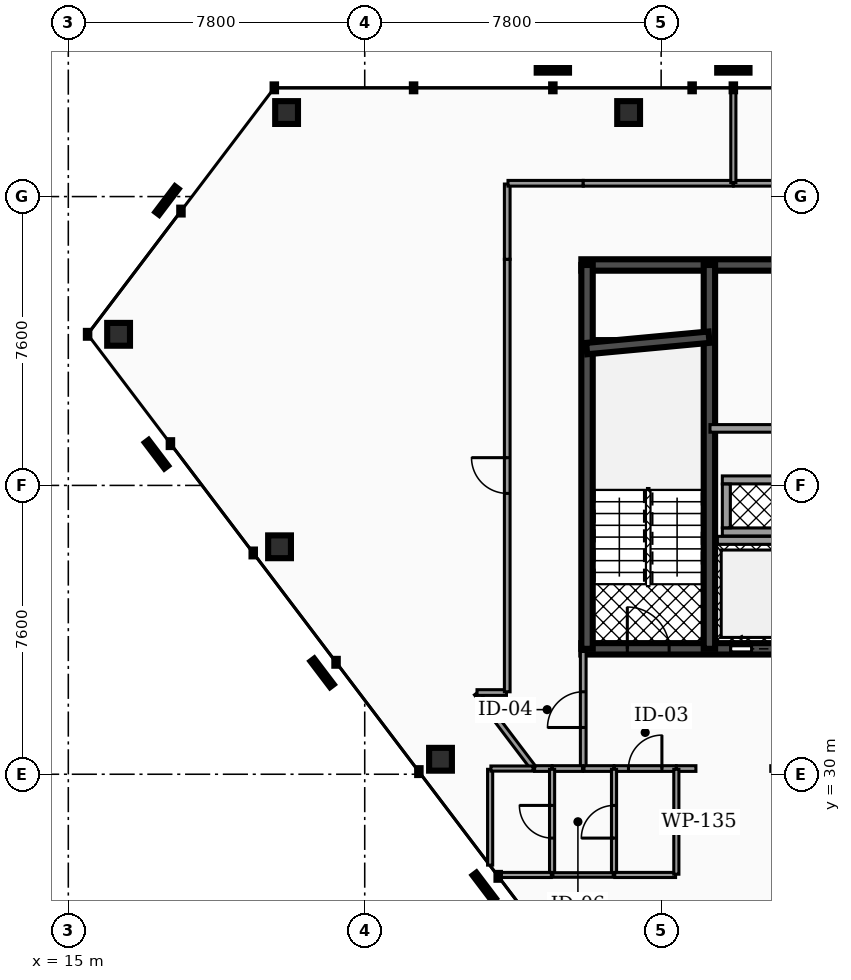
"""IFC4 building model, lengths in metres.
Left out: names, types, materials, properties, quantities, classifications, styles, units other than length and angle.
Written with IfcOpenShell. Run it as: python <this file> out.ifc"""

import sys

from ifc_helpers import new_model, si_unit, direction, frame, frame_2d, origin, origin_2d, place, context, subcontext, project, spatial, rectangle, hollow_rectangle, extrude, element, fill, save


model = new_model("IFC4")
c1 = context("Model", 3, precision=1e-05, world=origin(), true_north=direction((0.0, 1.0)))
c2 = subcontext(c1, "Body", "Model", "MODEL_VIEW")
j1 = project(units=[si_unit("LENGTHUNIT", "METRE"), si_unit("PLANEANGLEUNIT", "RADIAN")], contexts=[c1])
p1 = place(None, origin())
s1 = spatial("IfcSite", under=j1, at=p1, CompositionType="ELEMENT")
p2 = place(p1, origin())
s2 = spatial("IfcBuilding", under=s1, at=p2, CompositionType="ELEMENT")
p3 = place(p2, frame((0.0, 0.0, 246.16)))
s3 = spatial("IfcBuildingStorey", under=s2, at=p3, CompositionType="ELEMENT", Elevation=246.16)
p4 = place(p3, frame((28.5, 43.4, 0.0), z_axis=(0.0, 0.0, 1.0), x_axis=(1.0, 0.0, 0.0)))
e1 = element("IfcWall", 1, at=p4, inside=s3, PredefinedType="SHEAR", context=c2, shape_type="SweptSolid", body=[
    extrude(rectangle(XDim=19.86, YDim=0.3, at=frame_2d((9.93, 0.0))), origin(), (0.0, 0.0, 1.0), 3.18),
])
p5 = place(p3, frame((28.5, 33.3, 0.0), z_axis=(0.0, 0.0, 1.0), x_axis=(1.0, 0.0, 0.0)))
e2 = element("IfcWall", 2, at=p5, inside=s3, PredefinedType="SHEAR", context=c2, shape_type="SweptSolid", body=[
    extrude(rectangle(XDim=19.86, YDim=0.3, at=frame_2d((9.93, 0.0))), origin(), (0.0, 0.0, 1.0), 3.18),
])
p6 = place(p5, frame((3.93, 0.0, 0.0)))
e3 = element("IfcOpeningElement", 3, at=p6, cuts=e2, PredefinedType="OPENING", context=c2, shape_type="SweptSolid", body=[
    extrude(rectangle(XDim=1.1, YDim=2.15, at=frame_2d((0.55, 1.075))), frame((0.0, 0.16, 0.0), z_axis=(0.0, -1.0, 0.0), x_axis=(1.0, 0.0, 0.0)), (0.0, 0.0, 1.0), 0.32),
])
p7 = place(p5, frame((14.77, 0.0, 0.0)))
e4 = element("IfcOpeningElement", 4, at=p7, cuts=e2, PredefinedType="OPENING", context=c2, shape_type="SweptSolid", body=[
    extrude(rectangle(XDim=1.1, YDim=2.15, at=frame_2d((0.55, 1.075))), frame((0.0, 0.16, 0.0), z_axis=(0.0, -1.0, 0.0), x_axis=(1.0, 0.0, 0.0)), (0.0, 0.0, 1.0), 0.32),
])
p8 = place(p5, frame((11.25, 0.0, 0.0)))
e5 = element("IfcOpeningElement", 5, at=p8, cuts=e2, PredefinedType="OPENING", context=c2, shape_type="SweptSolid", body=[
    extrude(rectangle(XDim=1.0, YDim=2.1, at=frame_2d((0.5, 1.05))), frame((0.0, 0.16, 0.0), z_axis=(0.0, -1.0, 0.0), x_axis=(1.0, 0.0, 0.0)), (0.0, 0.0, 1.0), 0.32),
])
p9 = place(p5, frame((12.95, 0.0, 0.0)))
e6 = element("IfcOpeningElement", 6, at=p9, cuts=e2, PredefinedType="OPENING", context=c2, shape_type="SweptSolid", body=[
    extrude(rectangle(XDim=1.0, YDim=2.1, at=frame_2d((0.5, 1.05))), frame((0.0, 0.16, 0.0), z_axis=(0.0, -1.0, 0.0), x_axis=(1.0, 0.0, 0.0)), (0.0, 0.0, 1.0), 0.32),
])
p10 = place(p5, frame((5.85, 0.0, 0.0)))
e7 = element("IfcOpeningElement", 7, at=p10, cuts=e2, PredefinedType="OPENING", context=c2, shape_type="SweptSolid", body=[
    extrude(rectangle(XDim=1.0, YDim=2.1, at=frame_2d((0.5, 1.05))), frame((0.0, 0.16, 0.0), z_axis=(0.0, -1.0, 0.0), x_axis=(1.0, 0.0, 0.0)), (0.0, 0.0, 1.0), 0.32),
])
p11 = place(p5, frame((1.21, 0.0, 0.0)))
e8 = element("IfcOpeningElement", 8, at=p11, cuts=e2, PredefinedType="OPENING", context=c2, shape_type="SweptSolid", body=[
    extrude(rectangle(XDim=1.1, YDim=2.2, at=frame_2d((0.55, 1.1))), frame((0.0, 0.16, 0.0), z_axis=(0.0, -1.0, 0.0), x_axis=(1.0, 0.0, 0.0)), (0.0, 0.0, 1.0), 0.32),
])
p12 = place(p5, frame((9.34, 0.0, 0.0)))
e9 = element("IfcOpeningElement", 9, at=p12, cuts=e2, PredefinedType="OPENING", context=c2, shape_type="SweptSolid", body=[
    extrude(rectangle(XDim=1.12, YDim=2.05, at=frame_2d((0.56, 1.025))), frame((0.0, 0.16, 0.0), z_axis=(0.0, -1.0, 0.0), x_axis=(1.0, 0.0, 0.0)), (0.0, 0.0, 1.0), 0.32),
])
p13 = place(p5, frame((17.55, 0.0, 0.0)))
e10 = element("IfcOpeningElement", 10, at=p13, cuts=e2, PredefinedType="OPENING", context=c2, shape_type="SweptSolid", body=[
    extrude(rectangle(XDim=1.1, YDim=2.2, at=frame_2d((0.55, 1.1))), frame((0.0, 0.16, 0.0), z_axis=(0.0, -1.0, 0.0), x_axis=(1.0, 0.0, 0.0)), (0.0, 0.0, 1.0), 0.32),
])
for number, where, z_axis, x_axis in (
    (11, (28.65, 33.3, 0.0), (0.0, 0.0, 1.0), (0.0, 1.0, 0.0)),
    (12, (31.87, 33.3, 0.0), (0.0, 0.0, 1.0), (0.0, 1.0, 0.0)),
):
    element("IfcWall", number, at=place(p3, frame(where, z_axis=z_axis, x_axis=x_axis)), inside=s3, PredefinedType="SHEAR", context=c2, shape_type="SweptSolid", body=[
        extrude(rectangle(XDim=10.1, YDim=0.3, at=frame_2d((5.05, 0.0))), origin(), (0.0, 0.0, 1.0), 3.18),
    ])
p14 = place(p3, frame((28.64, 41.2, 0.0), z_axis=(0.0, 0.0, 1.0), x_axis=(0.995687118776, 0.092774789157, 0.0)))
e13 = element("IfcWall", 13, at=p14, inside=s3, PredefinedType="SHEAR", context=c2, shape_type="SweptSolid", body=[
    extrude(rectangle(XDim=3.234, YDim=0.3, at=frame_2d((1.617, 0.0))), origin(), (0.0, 0.0, 1.0), 3.18),
])
p15 = place(p3, frame((29.744, 47.411, 0.0), z_axis=(-0.029140422241, -0.036655583766, 0.998903000281), x_axis=(0.782782345555, -0.622295588517, 0.0)))
e14 = element("IfcColumn", 14, at=p15, inside=s3, PredefinedType="COLUMN", context=c2, shape_type="SweptSolid", body=[
    extrude(hollow_rectangle(XDim=0.6, YDim=0.6, WallThickness=0.03, at=origin_2d()), origin(), (0.0, 0.0, 1.0), 3.184),
])
p16 = place(p3, frame((20.744, 47.411, 0.0), z_axis=(-0.05247934681, -0.036620624489, 0.997950323423), x_axis=(0.572256499627, -0.820074690888, 0.0)))
e15 = element("IfcColumn", 15, at=p16, inside=s3, PredefinedType="COLUMN", context=c2, shape_type="SweptSolid", body=[
    extrude(hollow_rectangle(XDim=0.6, YDim=0.6, WallThickness=0.03, at=origin_2d()), origin(), (0.0, 0.0, 1.0), 3.187),
])
p17 = place(p3, frame((16.323, 41.576, 0.0), z_axis=(0.064812301761, 0.117985774684, 0.990897937485), x_axis=(-0.876466342156, 0.48146313573, 0.0)))
e16 = element("IfcColumn", 16, at=p17, inside=s3, PredefinedType="COLUMN", context=c2, shape_type="SweptSolid", body=[
    extrude(hollow_rectangle(XDim=0.6, YDim=0.6, WallThickness=0.03, at=origin_2d()), origin(), (0.0, 0.0, 1.0), 3.209),
])
p18 = place(p3, frame((20.559, 35.985, 0.0), z_axis=(0.073075454503, 0.107253453537, 0.991542573294), x_axis=(-0.826413430398, 0.563063799278, 0.0)))
e17 = element("IfcColumn", 17, at=p18, inside=s3, PredefinedType="COLUMN", context=c2, shape_type="SweptSolid", body=[
    extrude(hollow_rectangle(XDim=0.6, YDim=0.6, WallThickness=0.03, at=origin_2d()), origin(), (0.0, 0.0, 1.0), 3.207),
])
p19 = place(p3, frame((24.794, 30.394, 0.0), z_axis=(0.081334382112, 0.096489384022, 0.992005300922), x_axis=(-0.764598124332, 0.644507337637, 0.0)))
e18 = element("IfcColumn", 18, at=p19, inside=s3, PredefinedType="COLUMN", context=c2, shape_type="SweptSolid", body=[
    extrude(hollow_rectangle(XDim=0.6, YDim=0.6, WallThickness=0.03, at=origin_2d()), origin(), (0.0, 0.0, 1.0), 3.206),
])
p20 = place(p3, frame((32.08, 36.155, 0.0), z_axis=(0.0, 0.0, 1.0), x_axis=(1.0, 0.0, 0.0)))
e19 = element("IfcWall", 19, at=p20, inside=s3, PredefinedType="SOLIDWALL", context=c2, shape_type="SweptSolid", body=[
    extrude(rectangle(XDim=1.8, YDim=0.21, at=frame_2d((0.9, 0.0))), origin(), (0.0, 0.0, 1.0), 3.18),
])
for number, where, z_axis, x_axis in (
    (20, (32.21, 36.375, 0.0), (0.0, 0.0, 1.0), (1.0, 0.0, 0.0)),
    (21, (32.21, 37.745, 0.0), (0.0, 0.0, 1.0), (1.0, 0.0, 0.0)),
):
    element("IfcWall", number, at=place(p3, frame(where, z_axis=z_axis, x_axis=x_axis)), inside=s3, PredefinedType="SOLIDWALL", context=c2, shape_type="SweptSolid", body=[
        extrude(rectangle(XDim=1.6, YDim=0.21, at=frame_2d((0.8, 0.0))), origin(), (0.0, 0.0, 1.0), 3.18),
    ])
p21 = place(p3, frame((32.315, 36.485, 0.0), z_axis=(0.0, 0.0, 1.0), x_axis=(0.0, 1.0, 0.0)))
e22 = element("IfcWall", 22, at=p21, inside=s3, PredefinedType="SOLIDWALL", context=c2, shape_type="SweptSolid", body=[
    extrude(rectangle(XDim=1.15, YDim=0.21, at=frame_2d((0.575, 0.0))), origin(), (0.0, 0.0, 1.0), 3.18),
])
p22 = place(p3, frame((31.885, 39.1, 0.0), z_axis=(0.0, 0.0, 1.0), x_axis=(1.0, 0.0, 0.0)))
e23 = element("IfcWall", 23, at=p22, inside=s3, PredefinedType="PARTITIONING", context=c2, shape_type="SweptSolid", body=[
    extrude(rectangle(XDim=5.645, YDim=0.2, at=frame_2d((2.823, 0.0))), origin(), (0.0, 0.0, 1.0), 2.235),
])
p23 = place(p3, frame((28.55, 30.17, 0.0), z_axis=(0.0, 0.0, 1.0), x_axis=(0.0, 1.0, 0.0)))
e24 = element("IfcWall", 24, at=p23, inside=s3, PredefinedType="PARTITIONING", context=c2, shape_type="SweptSolid", body=[
    extrude(rectangle(XDim=3.06, YDim=0.15, at=frame_2d((1.53, 0.0))), origin(), (0.0, 0.0, 1.0), 2.235),
])
p24 = place(p23, frame((1.06, 0.0, 0.0)))
e25 = element("IfcOpeningElement", 25, at=p24, cuts=e24, PredefinedType="OPENING", context=c2, shape_type="SweptSolid", body=[
    extrude(rectangle(XDim=0.94, YDim=2.05, at=frame_2d((0.47, 1.025))), frame((0.0, 0.085, 0.0), z_axis=(0.0, -1.0, 0.0), x_axis=(1.0, 0.0, 0.0)), (0.0, 0.0, 1.0), 0.17),
])
p25 = place(p3, frame((29.365, 30.15, 0.0), z_axis=(0.0, 0.0, 1.0), x_axis=(1.0, 0.0, 0.0)))
e26 = element("IfcWall", 26, at=p25, inside=s3, PredefinedType="PARTITIONING", context=c2, shape_type="SweptSolid", body=[
    extrude(rectangle(XDim=1.63, YDim=0.15, at=frame_2d((0.815, 0.0))), origin(), (0.0, 0.0, 1.0), 2.235),
])
p26 = place(p25, frame((0.375, 0.0, 0.0)))
e27 = element("IfcOpeningElement", 27, at=p26, cuts=e26, PredefinedType="OPENING", context=c2, shape_type="SweptSolid", body=[
    extrude(rectangle(XDim=0.88, YDim=2.05, at=frame_2d((0.44, 1.025))), frame((0.0, 0.085, 0.0), z_axis=(0.0, -1.0, 0.0), x_axis=(1.0, 0.0, 0.0)), (0.0, 0.0, 1.0), 0.17),
])
p27 = place(p3, frame((28.57, 30.15, 0.0), z_axis=(0.0, 0.0, 1.0), x_axis=(1.0, 0.0, 0.0)))
e28 = element("IfcWall", 28, at=p27, inside=s3, PredefinedType="PARTITIONING", context=c2, shape_type="SweptSolid", body=[
    extrude(rectangle(XDim=0.785, YDim=0.15, at=frame_2d((0.393, 0.0))), origin(), (0.0, 0.0, 1.0), 2.235),
])
p28 = place(p3, frame((33.485, 30.15, 0.0), z_axis=(0.0, 0.0, 1.0), x_axis=(1.0, 0.0, 0.0)))
e29 = element("IfcWall", 29, at=p28, inside=s3, PredefinedType="PARTITIONING", context=c2, shape_type="SweptSolid", body=[
    extrude(rectangle(XDim=9.83, YDim=0.15, at=frame_2d((4.915, 0.0))), origin(), (0.0, 0.0, 1.0), 2.235),
])
p29 = place(p28, frame((0.445, 0.0, 0.0)))
e30 = element("IfcOpeningElement", 30, at=p29, cuts=e29, PredefinedType="OPENING", context=c2, shape_type="SweptSolid", body=[
    extrude(rectangle(XDim=0.94, YDim=2.05, at=frame_2d((0.47, 1.025))), frame((0.0, 0.085, 0.0), z_axis=(0.0, -1.0, 0.0), x_axis=(1.0, 0.0, 0.0)), (0.0, 0.0, 1.0), 0.17),
])
p30 = place(p3, frame((31.005, 30.15, 0.0), z_axis=(0.0, 0.0, 1.0), x_axis=(1.0, 0.0, 0.0)))
e31 = element("IfcWall", 31, at=p30, inside=s3, PredefinedType="PARTITIONING", context=c2, shape_type="SweptSolid", body=[
    extrude(rectangle(XDim=0.51, YDim=0.15, at=frame_2d((0.255, 0.0))), origin(), (0.0, 0.0, 1.0), 2.235),
])
p31 = place(p3, frame((27.27, 30.15, 0.0), z_axis=(0.0, 0.0, 1.0), x_axis=(1.0, 0.0, 0.0)))
e32 = element("IfcWall", 32, at=p31, inside=s3, PredefinedType="PARTITIONING", context=c2, shape_type="SweptSolid", body=[
    extrude(rectangle(XDim=0.455, YDim=0.15, at=frame_2d((0.228, 0.0))), origin(), (0.0, 0.0, 1.0), 2.235),
])
p32 = place(p3, frame((27.735, 30.15, 0.0), z_axis=(0.0, 0.0, 1.0), x_axis=(1.0, 0.0, 0.0)))
e33 = element("IfcWall", 33, at=p32, inside=s3, PredefinedType="PARTITIONING", context=c2, shape_type="SweptSolid", body=[
    extrude(rectangle(XDim=0.795, YDim=0.15, at=frame_2d((0.397, 0.0))), origin(), (0.0, 0.0, 1.0), 2.235),
])
p33 = place(p3, frame((25.747, 32.134, 0.0), z_axis=(0.0, 0.0, 1.0), x_axis=(0.603931928578, -0.797035899847, 0.0)))
e34 = element("IfcWall", 34, at=p33, inside=s3, PredefinedType="PARTITIONING", context=c2, shape_type="SweptSolid", body=[
    extrude(rectangle(XDim=2.469, YDim=0.15, at=frame_2d((1.235, 0.0))), origin(), (0.0, 0.0, 1.0), 2.235),
])
p34 = place(p3, frame((25.755, 32.15, 0.0), z_axis=(0.0, 0.0, 1.0), x_axis=(1.0, 0.0, 0.0)))
e35 = element("IfcWall", 35, at=p34, inside=s3, PredefinedType="PARTITIONING", context=c2, shape_type="SweptSolid", body=[
    extrude(rectangle(XDim=0.775, YDim=0.15, at=frame_2d((0.388, 0.0))), origin(), (0.0, 0.0, 1.0), 2.235),
])
p35 = place(p3, frame((26.55, 32.17, 0.0), z_axis=(0.0, 0.0, 1.0), x_axis=(0.0, 1.0, 0.0)))
e36 = element("IfcWall", 36, at=p35, inside=s3, PredefinedType="PARTITIONING", context=c2, shape_type="SweptSolid", body=[
    extrude(rectangle(XDim=11.38, YDim=0.15, at=frame_2d((5.69, 0.0))), origin(), (0.0, 0.0, 1.0), 2.235),
])
p36 = place(p35, frame((5.22, 0.0, 0.0)))
e37 = element("IfcOpeningElement", 37, at=p36, cuts=e36, PredefinedType="OPENING", context=c2, shape_type="SweptSolid", body=[
    extrude(rectangle(XDim=0.94, YDim=2.05, at=frame_2d((0.47, 1.025))), frame((0.0, 0.085, 0.0), z_axis=(0.0, -1.0, 0.0), x_axis=(1.0, 0.0, 0.0)), (0.0, 0.0, 1.0), 0.17),
])
for number, where, z_axis, x_axis in (
    (38, (26.55, 43.55, 0.0), (0.0, 0.0, 1.0), (0.0, 1.0, 0.0)),
    (39, (26.57, 45.55, 0.0), (0.0, 0.0, 1.0), (1.0, 0.0, 0.0)),
):
    element("IfcWall", number, at=place(p3, frame(where, z_axis=z_axis, x_axis=x_axis)), inside=s3, PredefinedType="PARTITIONING", context=c2, shape_type="SweptSolid", body=[
        extrude(rectangle(XDim=1.98, YDim=0.15, at=frame_2d((0.99, 0.0))), origin(), (0.0, 0.0, 1.0), 2.235),
    ])
p37 = place(p3, frame((28.55, 45.55, 0.0), z_axis=(0.0, 0.0, 1.0), x_axis=(1.0, 0.0, 0.0)))
e40 = element("IfcWall", 40, at=p37, inside=s3, PredefinedType="PARTITIONING", context=c2, shape_type="SweptSolid", body=[
    extrude(rectangle(XDim=3.945, YDim=0.15, at=frame_2d((1.973, 0.0))), origin(), (0.0, 0.0, 1.0), 2.235),
])
p38 = place(p3, frame((32.505, 45.55, 0.0), z_axis=(0.0, 0.0, 1.0), x_axis=(1.0, 0.0, 0.0)))
e41 = element("IfcWall", 41, at=p38, inside=s3, PredefinedType="PARTITIONING", context=c2, shape_type="SweptSolid", body=[
    extrude(rectangle(XDim=2.114, YDim=0.15, at=frame_2d((1.057, 0.0))), origin(), (0.0, 0.0, 1.0), 2.235),
])
p39 = place(p3, frame((29.36, 27.37, 0.0), z_axis=(0.0, 0.0, 1.0), x_axis=(0.0, 1.0, 0.0)))
e42 = element("IfcWall", 42, at=p39, inside=s3, PredefinedType="PARTITIONING", context=c2, shape_type="SweptSolid", body=[
    extrude(rectangle(XDim=2.76, YDim=0.135, at=frame_2d((1.38, 0.0))), origin(), (0.0, 0.0, 1.0), 2.235),
])
p40 = place(p39, frame((0.95, 0.0, 0.0)))
e43 = element("IfcOpeningElement", 43, at=p40, cuts=e42, PredefinedType="OPENING", context=c2, shape_type="SweptSolid", body=[
    extrude(rectangle(XDim=0.86, YDim=2.05, at=frame_2d((0.43, 1.025))), frame((0.0, 0.077, 0.0), z_axis=(0.0, -1.0, 0.0), x_axis=(1.0, 0.0, 0.0)), (0.0, 0.0, 1.0), 0.155),
])
p41 = place(p3, frame((29.38, 27.35, 0.0), z_axis=(0.0, 0.0, 1.0), x_axis=(1.0, 0.0, 0.0)))
e44 = element("IfcWall", 44, at=p41, inside=s3, PredefinedType="PARTITIONING", context=c2, shape_type="SweptSolid", body=[
    extrude(rectangle(XDim=1.6, YDim=0.135, at=frame_2d((0.8, 0.0))), origin(), (0.0, 0.0, 1.0), 2.235),
])
p42 = place(p3, frame((31.0, 27.37, 0.0), z_axis=(0.0, 0.0, 1.0), x_axis=(0.0, 1.0, 0.0)))
e45 = element("IfcWall", 45, at=p42, inside=s3, PredefinedType="PARTITIONING", context=c2, shape_type="SweptSolid", body=[
    extrude(rectangle(XDim=2.76, YDim=0.135, at=frame_2d((1.38, 0.0))), origin(), (0.0, 0.0, 1.0), 2.235),
])
p43 = place(p3, frame((27.73, 27.37, 0.0), z_axis=(0.0, 0.0, 1.0), x_axis=(0.0, 1.0, 0.0)))
e46 = element("IfcWall", 46, at=p43, inside=s3, PredefinedType="PARTITIONING", context=c2, shape_type="SweptSolid", body=[
    extrude(rectangle(XDim=2.76, YDim=0.135, at=frame_2d((1.38, 0.0))), origin(), (0.0, 0.0, 1.0), 2.235),
])
p44 = place(p43, frame((0.95, 0.0, 0.0)))
e47 = element("IfcOpeningElement", 47, at=p44, cuts=e46, PredefinedType="OPENING", context=c2, shape_type="SweptSolid", body=[
    extrude(rectangle(XDim=0.86, YDim=2.05, at=frame_2d((0.43, 1.025))), frame((0.0, 0.077, 0.0), z_axis=(0.0, -1.0, 0.0), x_axis=(1.0, 0.0, 0.0)), (0.0, 0.0, 1.0), 0.155),
])
p45 = place(p3, frame((26.3, 27.35, 0.0), z_axis=(0.0, 0.0, 1.0), x_axis=(1.0, 0.0, 0.0)))
e48 = element("IfcWall", 48, at=p45, inside=s3, PredefinedType="PARTITIONING", context=c2, shape_type="SweptSolid", body=[
    extrude(rectangle(XDim=1.41, YDim=0.135, at=frame_2d((0.705, 0.0))), origin(), (0.0, 0.0, 1.0), 2.235),
])
p46 = place(p3, frame((26.1, 27.609, 0.0), z_axis=(0.0, 0.0, 1.0), x_axis=(0.0, 1.0, 0.0)))
e49 = element("IfcWall", 49, at=p46, inside=s3, PredefinedType="PARTITIONING", context=c2, shape_type="SweptSolid", body=[
    extrude(rectangle(XDim=2.521, YDim=0.135, at=frame_2d((1.26, 0.0))), origin(), (0.0, 0.0, 1.0), 2.235),
])
p47 = place(p3, frame((26.12, 30.15, 0.0), z_axis=(0.0, 0.0, 1.0), x_axis=(1.0, 0.0, 0.0)))
e50 = element("IfcWall", 50, at=p47, inside=s3, PredefinedType="PARTITIONING", context=c2, shape_type="SweptSolid", body=[
    extrude(rectangle(XDim=1.11, YDim=0.135, at=frame_2d((0.555, 0.0))), origin(), (0.0, 0.0, 1.0), 2.235),
])
p48 = place(p3, frame((27.75, 27.35, 0.0), z_axis=(0.0, 0.0, 1.0), x_axis=(1.0, 0.0, 0.0)))
e51 = element("IfcWall", 51, at=p48, inside=s3, PredefinedType="PARTITIONING", context=c2, shape_type="SweptSolid", body=[
    extrude(rectangle(XDim=1.59, YDim=0.12, at=frame_2d((0.795, 0.0))), origin(), (0.0, 0.0, 1.0), 2.235),
])
p49 = place(p3, frame((32.5, 45.57, 0.0), z_axis=(0.0, 0.0, 1.0), x_axis=(0.0, 1.0, 0.0)))
e52 = element("IfcWall", 52, at=p49, inside=s3, PredefinedType="PARTITIONING", context=c2, shape_type="SweptSolid", body=[
    extrude(rectangle(XDim=2.476, YDim=0.135, at=frame_2d((1.238, 0.0))), origin(), (0.0, 0.0, 1.0), 2.235),
])
p50 = place(p6, origin())
e53 = element("IfcDoor", 53, at=p50, inside=s3, OperationType="SLIDING_TO_LEFT", PredefinedType="DOOR", context=c2, shape_type="SweptSolid", body=[
    extrude(rectangle(XDim=1.1, YDim=2.15, at=frame_2d((0.55, 1.075))), frame((0.0, 0.025, 0.0), z_axis=(0.0, -1.0, 0.0), x_axis=(1.0, 0.0, 0.0)), (0.0, 0.0, 1.0), 0.05),
])
fill(e3, e53)
p51 = place(p11, origin())
e54 = element("IfcDoor", 54, at=p51, inside=s3, OperationType="SINGLE_SWING_LEFT", PredefinedType="DOOR", context=c2, shape_type="SweptSolid", body=[
    extrude(rectangle(XDim=1.1, YDim=2.2, at=frame_2d((0.55, 1.1))), frame((0.0, 0.025, 0.0), z_axis=(0.0, -1.0, 0.0), x_axis=(1.0, 0.0, 0.0)), (0.0, 0.0, 1.0), 0.05),
])
fill(e8, e54)
p52 = place(p24, origin())
e55 = element("IfcDoor", 55, at=p52, inside=s3, OperationType="SINGLE_SWING_LEFT", PredefinedType="DOOR", context=c2, shape_type="SweptSolid", body=[
    extrude(rectangle(XDim=0.94, YDim=2.05, at=frame_2d((0.47, 1.025))), frame((0.0, 0.025, 0.0), z_axis=(0.0, -1.0, 0.0), x_axis=(1.0, 0.0, 0.0)), (0.0, 0.0, 1.0), 0.05),
])
fill(e25, e55)
p53 = place(p26, origin())
e56 = element("IfcDoor", 56, at=p53, inside=s3, OperationType="SINGLE_SWING_RIGHT", PredefinedType="DOOR", context=c2, shape_type="SweptSolid", body=[
    extrude(rectangle(XDim=0.88, YDim=2.05, at=frame_2d((0.44, 1.025))), frame((0.0, 0.025, 0.0), z_axis=(0.0, -1.0, 0.0), x_axis=(1.0, 0.0, 0.0)), (0.0, 0.0, 1.0), 0.05),
])
fill(e27, e56)
p54 = place(p36, origin())
e57 = element("IfcDoor", 57, at=p54, inside=s3, OperationType="SINGLE_SWING_RIGHT", PredefinedType="DOOR", context=c2, shape_type="SweptSolid", body=[
    extrude(rectangle(XDim=0.94, YDim=2.05, at=frame_2d((0.47, 1.025))), frame((0.0, 0.025, 0.0), z_axis=(0.0, -1.0, 0.0), x_axis=(1.0, 0.0, 0.0)), (0.0, 0.0, 1.0), 0.05),
])
fill(e37, e57)
p55 = place(p40, origin())
e58 = element("IfcDoor", 58, at=p55, inside=s3, OperationType="SINGLE_SWING_LEFT", PredefinedType="DOOR", context=c2, shape_type="SweptSolid", body=[
    extrude(rectangle(XDim=0.86, YDim=2.05, at=frame_2d((0.43, 1.025))), frame((0.0, 0.025, 0.0), z_axis=(0.0, -1.0, 0.0), x_axis=(1.0, 0.0, 0.0)), (0.0, 0.0, 1.0), 0.05),
])
fill(e43, e58)
p56 = place(p44, origin())
e59 = element("IfcDoor", 59, at=p56, inside=s3, OperationType="SINGLE_SWING_RIGHT", PredefinedType="DOOR", context=c2, shape_type="SweptSolid", body=[
    extrude(rectangle(XDim=0.86, YDim=2.05, at=frame_2d((0.43, 1.025))), frame((0.0, 0.025, 0.0), z_axis=(0.0, -1.0, 0.0), x_axis=(1.0, 0.0, 0.0)), (0.0, 0.0, 1.0), 0.05),
])
fill(e47, e59)
save(model, sys.argv[1])
